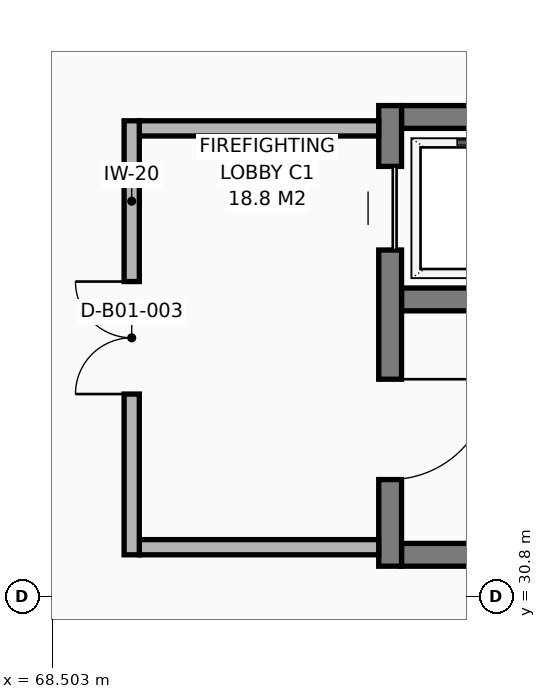
"""IFC4 building model, lengths in metres.
Left out: names, types, materials, properties, quantities, classifications, styles, units other than length and angle.
Written with IfcOpenShell. Run it as: python <this file> out.ifc"""

import sys

from ifc_helpers import new_model, si_unit, direction, frame, frame_2d, origin, place, context, subcontext, project, spatial, rectangle, extrude, element, fill, save


model = new_model("IFC4")
c1 = context("Model", 3, precision=1e-05, world=origin(), true_north=direction((0.0, 1.0)))
c2 = subcontext(c1, "Body", "Model", "MODEL_VIEW")
j1 = project(units=[si_unit("LENGTHUNIT", "METRE"), si_unit("PLANEANGLEUNIT", "RADIAN")], contexts=[c1])
p1 = place(None, origin())
s1 = spatial("IfcSite", under=j1, at=p1, CompositionType="ELEMENT")
p2 = place(p1, origin())
s2 = spatial("IfcBuilding", under=s1, at=p2, CompositionType="ELEMENT")
p3 = place(p2, frame((0.0, 0.0, -4.8)))
s3 = spatial("IfcBuildingStorey", under=s2, at=p3, CompositionType="ELEMENT", Elevation=-4.8)
for number, where, z_axis, x_axis in (
    (1, (73.1, 31.35, 0.0), (0.0, 0.0, 1.0), (1.0, 0.0, 0.0)),
    (2, (80.8, 34.71, 0.0), (0.0, 0.0, 1.0), (-1.0, 0.0, 0.0)),
):
    element("IfcWall", number, at=place(p3, frame(where, z_axis=z_axis, x_axis=x_axis)), inside=s3, PredefinedType="SHEAR", context=c2, shape_type="SweptSolid", body=[
        extrude(rectangle(XDim=7.7, YDim=0.3, at=frame_2d((3.85, 0.0))), origin(), (0.0, 0.0, 1.0), 4.55),
    ])
p4 = place(p3, frame((76.3, 37.11, 0.0), z_axis=(0.0, 0.0, 1.0), x_axis=(-1.0, 0.0, 0.0)))
e3 = element("IfcWall", 3, at=p4, inside=s3, PredefinedType="SHEAR", context=c2, shape_type="SweptSolid", body=[
    extrude(rectangle(XDim=3.2, YDim=0.3, at=frame_2d((1.6, 0.0))), origin(), (0.0, 0.0, 1.0), 4.55),
])
p5 = place(p3, frame((72.95, 37.26, 0.0), z_axis=(0.0, 0.0, 1.0), x_axis=(0.0, -1.0, 0.0)))
e4 = element("IfcWall", 4, at=p5, inside=s3, PredefinedType="SHEAR", context=c2, shape_type="SweptSolid", body=[
    extrude(rectangle(XDim=6.06, YDim=0.3, at=frame_2d((3.03, 0.0))), origin(), (0.0, 0.0, 1.0), 4.55),
])
p6 = place(p5, frame((0.8, 0.0, 0.0)))
e5 = element("IfcOpeningElement", 5, at=p6, cuts=e4, PredefinedType="OPENING", context=c2, shape_type="SweptSolid", body=[
    extrude(rectangle(XDim=1.1, YDim=2.12, at=frame_2d((0.55, 1.06))), frame((0.0, 0.16, 0.0), z_axis=(0.0, -1.0, 0.0), x_axis=(1.0, 0.0, 0.0)), (0.0, 0.0, 1.0), 0.32),
])
p7 = place(p5, frame((3.6, 0.0, 0.0)))
e6 = element("IfcOpeningElement", 6, at=p7, cuts=e4, PredefinedType="OPENING", context=c2, shape_type="SweptSolid", body=[
    extrude(rectangle(XDim=1.32, YDim=2.12, at=frame_2d((0.66, 1.06))), frame((0.0, 0.16, 0.0), z_axis=(0.0, -1.0, 0.0), x_axis=(1.0, 0.0, 0.0)), (0.0, 0.0, 1.0), 0.32),
])
p8 = place(p3, frame((69.65, 31.45, 0.0), z_axis=(0.0, 0.0, 1.0), x_axis=(1.0, 0.0, 0.0)))
e7 = element("IfcWall", 7, at=p8, inside=s3, PredefinedType="PARTITIONING", context=c2, shape_type="SweptSolid", body=[
    extrude(rectangle(XDim=3.15, YDim=0.2, at=frame_2d((1.575, 0.0))), origin(), (0.0, 0.0, 1.0), 3.94),
])
p9 = place(p3, frame((72.8, 36.96, 0.0), z_axis=(0.0, 0.0, 1.0), x_axis=(-1.0, 0.0, 0.0)))
e8 = element("IfcWall", 8, at=p9, inside=s3, PredefinedType="PARTITIONING", context=c2, shape_type="SweptSolid", body=[
    extrude(rectangle(XDim=3.15, YDim=0.2, at=frame_2d((1.575, 0.0))), origin(), (0.0, 0.0, 1.0), 4.55),
])
p10 = place(p3, frame((69.55, 31.35, 0.0), z_axis=(0.0, 0.0, 1.0), x_axis=(0.0, 1.0, 0.0)))
e9 = element("IfcWall", 9, at=p10, inside=s3, PredefinedType="PARTITIONING", context=c2, shape_type="SweptSolid", body=[
    extrude(rectangle(XDim=5.71, YDim=0.2, at=frame_2d((2.855, 0.0))), origin(), (0.0, 0.0, 1.0), 3.94),
])
p11 = place(p10, frame((2.115, 0.0, 0.0)))
e10 = element("IfcOpeningElement", 10, at=p11, cuts=e9, PredefinedType="OPENING", context=c2, shape_type="SweptSolid", body=[
    extrude(rectangle(XDim=1.48, YDim=2.15, at=frame_2d((0.74, 1.075))), frame((0.0, 0.11, 0.0), z_axis=(0.0, -1.0, 0.0), x_axis=(1.0, 0.0, 0.0)), (0.0, 0.0, 1.0), 0.22),
])
p12 = place(p6, origin())
e11 = element("IfcDoor", 11, at=p12, inside=s3, OperationType="SLIDING_TO_LEFT", PredefinedType="DOOR", context=c2, shape_type="SweptSolid", body=[
    extrude(rectangle(XDim=1.1, YDim=2.12, at=frame_2d((0.55, 1.06))), frame((0.0, 0.025, 0.0), z_axis=(0.0, -1.0, 0.0), x_axis=(1.0, 0.0, 0.0)), (0.0, 0.0, 1.0), 0.05),
])
fill(e5, e11)
p13 = place(p7, origin())
e12 = element("IfcDoor", 12, at=p13, inside=s3, OperationType="SINGLE_SWING_LEFT", PredefinedType="DOOR", context=c2, shape_type="SweptSolid", body=[
    extrude(rectangle(XDim=1.32, YDim=2.12, at=frame_2d((0.66, 1.06))), frame((0.0, 0.025, 0.0), z_axis=(0.0, -1.0, 0.0), x_axis=(1.0, 0.0, 0.0)), (0.0, 0.0, 1.0), 0.05),
])
fill(e6, e12)
p14 = place(p11, origin())
e13 = element("IfcDoor", 13, at=p14, inside=s3, OperationType="DOUBLE_DOOR_SINGLE_SWING", PredefinedType="DOOR", context=c2, shape_type="SweptSolid", body=[
    extrude(rectangle(XDim=1.48, YDim=2.15, at=frame_2d((0.74, 1.075))), frame((0.0, 0.025, 0.0), z_axis=(0.0, -1.0, 0.0), x_axis=(1.0, 0.0, 0.0)), (0.0, 0.0, 1.0), 0.05),
])
fill(e10, e13)
save(model, sys.argv[1])
